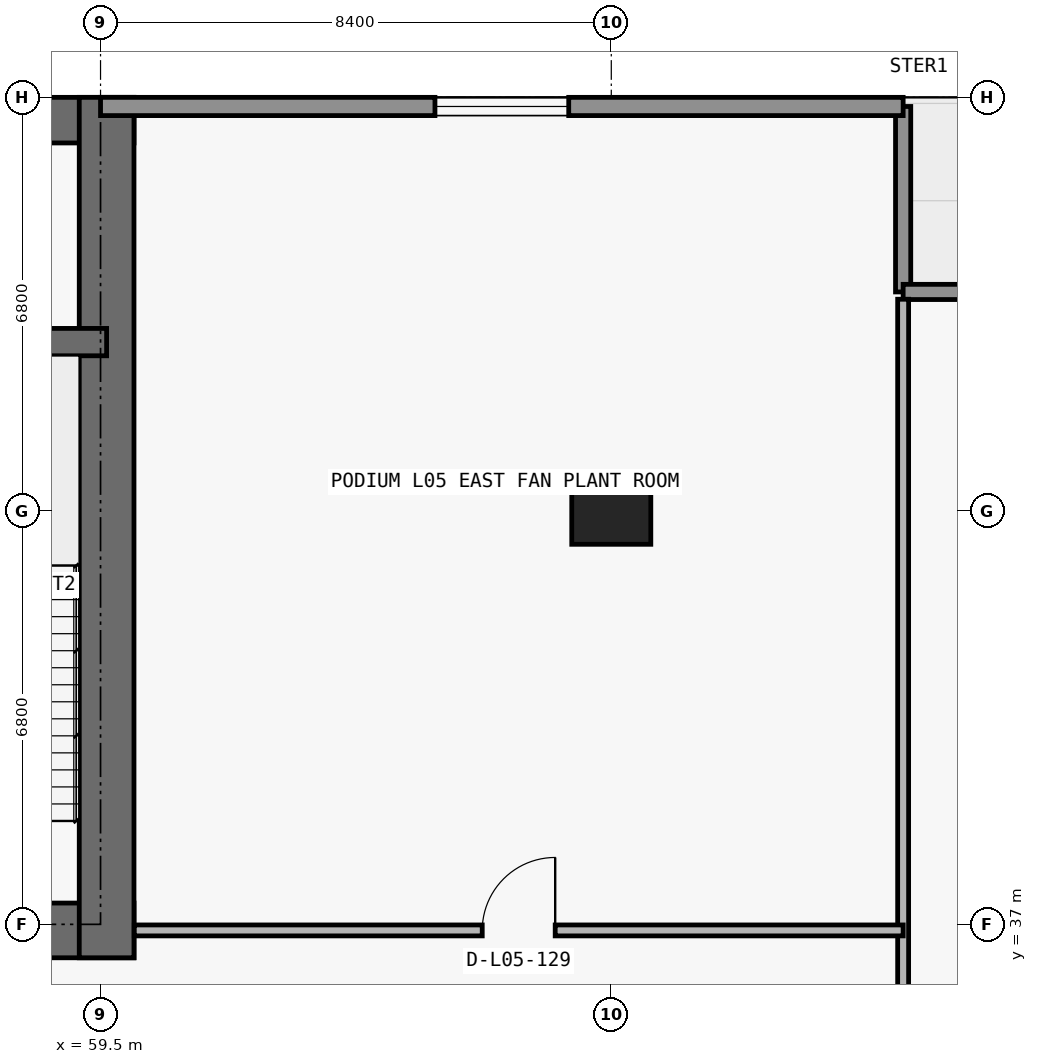
"""IFC4 building model, lengths in metres.
Left out: names, types, materials, properties, quantities, classifications, styles, units other than length and angle.
Written with IfcOpenShell. Run it as: python <this file> out.ifc"""

import sys

from ifc_helpers import new_model, si_unit, direction, frame, frame_2d, origin, origin_2d, place, context, subcontext, project, spatial, rectangle, extrude, element, fill, save


model = new_model("IFC4")
c1 = context("Model", 3, precision=1e-05, world=origin(), true_north=direction((0.0, 1.0)))
c2 = subcontext(c1, "Body", "Model", "MODEL_VIEW")
j1 = project(units=[si_unit("LENGTHUNIT", "METRE"), si_unit("PLANEANGLEUNIT", "RADIAN")], contexts=[c1])
p1 = place(None, origin())
s1 = spatial("IfcSite", under=j1, at=p1, CompositionType="ELEMENT")
p2 = place(p1, origin())
s2 = spatial("IfcBuilding", under=s1, at=p2, CompositionType="ELEMENT")
p3 = place(p2, frame((0.0, 0.0, 24.6)))
s3 = spatial("IfcBuildingStorey", under=s2, at=p3, CompositionType="ELEMENT", Elevation=24.6)
p4 = place(p3, frame((67.9, 43.8, 0.0), z_axis=(0.0, 0.0, 1.0), x_axis=(1.0, 0.0, 0.0)))
e1 = element("IfcColumn", 1, at=p4, inside=s3, PredefinedType="COLUMN", context=c2, shape_type="SweptSolid", body=[
    extrude(rectangle(XDim=1.3, YDim=1.1, at=origin_2d()), origin(), (0.0, 0.0, 1.0), 5.15),
])
p5 = place(p3, frame((17.75, 36.9, 0.0), z_axis=(0.0, 0.0, 1.0), x_axis=(1.0, 0.0, 0.0)))
e2 = element("IfcWall", 2, at=p5, inside=s3, PredefinedType="SHEAR", context=c2, shape_type="SweptSolid", body=[
    extrude(rectangle(XDim=42.3, YDim=0.9, at=frame_2d((21.15, 0.0))), origin(), (0.0, 0.0, 1.0), 5.15),
])
p6 = place(p5, frame((14.55, 0.0, 0.0)))
e3 = element("IfcOpeningElement", 3, at=p6, cuts=e2, PredefinedType="OPENING", context=c2, shape_type="SweptSolid", body=[
    extrude(rectangle(XDim=1.1, YDim=2.15, at=frame_2d((0.55, 1.075))), frame((0.0, 0.46, 0.0), z_axis=(0.0, -1.0, 0.0), x_axis=(1.0, 0.0, 0.0)), (0.0, 0.0, 1.0), 0.92),
])
p7 = place(p5, frame((6.4, 0.0, 0.0)))
e4 = element("IfcOpeningElement", 4, at=p7, cuts=e2, PredefinedType="OPENING", context=c2, shape_type="SweptSolid", body=[
    extrude(rectangle(XDim=1.05, YDim=2.15, at=frame_2d((0.525, 1.075))), frame((0.0, 0.46, 0.0), z_axis=(0.0, -1.0, 0.0), x_axis=(1.0, 0.0, 0.0)), (0.0, 0.0, 1.0), 0.92),
])
p8 = place(p5, frame((34.9, 0.0, 0.0)))
e5 = element("IfcOpeningElement", 5, at=p8, cuts=e2, PredefinedType="OPENING", context=c2, shape_type="SweptSolid", body=[
    extrude(rectangle(XDim=1.05, YDim=2.15, at=frame_2d((0.525, 1.075))), frame((0.0, 0.46, 0.0), z_axis=(0.0, -1.0, 0.0), x_axis=(1.0, 0.0, 0.0)), (0.0, 0.0, 1.0), 0.92),
])
p9 = place(p5, frame((11.012, 0.0, 0.0)))
e6 = element("IfcOpeningElement", 6, at=p9, cuts=e2, PredefinedType="OPENING", context=c2, shape_type="SweptSolid", body=[
    extrude(rectangle(XDim=1.05, YDim=2.15, at=frame_2d((0.525, 1.075))), frame((0.0, 0.46, 0.0), z_axis=(0.0, -1.0, 0.0), x_axis=(1.0, 0.0, 0.0)), (0.0, 0.0, 1.0), 0.92),
])
p10 = place(p5, frame((24.25, 0.0, 0.0)))
e7 = element("IfcOpeningElement", 7, at=p10, cuts=e2, PredefinedType="OPENING", context=c2, shape_type="SweptSolid", body=[
    extrude(rectangle(XDim=1.05, YDim=2.15, at=frame_2d((0.525, 1.075))), frame((0.0, 0.46, 0.0), z_axis=(0.0, -1.0, 0.0), x_axis=(1.0, 0.0, 0.0)), (0.0, 0.0, 1.0), 0.92),
])
p11 = place(p3, frame((17.75, 50.225, 0.0), z_axis=(0.0, 0.0, 1.0), x_axis=(1.0, 0.0, 0.0)))
e8 = element("IfcWall", 8, at=p11, inside=s3, PredefinedType="SHEAR", context=c2, shape_type="SweptSolid", body=[
    extrude(rectangle(XDim=42.3, YDim=0.75, at=frame_2d((21.15, 0.0))), origin(), (0.0, 0.0, 1.0), 5.15),
])
p12 = place(p3, frame((59.6, 36.45, 0.0), z_axis=(0.0, 0.0, 1.0), x_axis=(0.0, 1.0, 0.0)))
e9 = element("IfcWall", 9, at=p12, inside=s3, PredefinedType="SHEAR", context=c2, shape_type="SweptSolid", body=[
    extrude(rectangle(XDim=14.15, YDim=0.9, at=frame_2d((7.075, 0.0))), origin(), (0.0, 0.0, 1.0), 5.15),
])
p13 = place(p3, frame((18.2, 46.575, 0.0), z_axis=(0.0, 0.0, 1.0), x_axis=(1.0, 0.0, 0.0)))
e10 = element("IfcWall", 10, at=p13, inside=s3, PredefinedType="SHEAR", context=c2, shape_type="SweptSolid", body=[
    extrude(rectangle(XDim=41.4, YDim=0.45, at=frame_2d((20.7, 0.0))), origin(), (0.0, 0.0, 1.0), 5.15),
])
p14 = place(p13, frame((7.675, 0.0, 0.0)))
e11 = element("IfcOpeningElement", 11, at=p14, cuts=e10, PredefinedType="OPENING", context=c2, shape_type="SweptSolid", body=[
    extrude(rectangle(XDim=1.05, YDim=2.15, at=frame_2d((0.525, 1.075))), frame((0.0, 0.235, 0.0), z_axis=(0.0, -1.0, 0.0), x_axis=(1.0, 0.0, 0.0)), (0.0, 0.0, 1.0), 0.47),
])
p15 = place(p13, frame((32.725, 0.0, 0.0)))
e12 = element("IfcOpeningElement", 12, at=p15, cuts=e10, PredefinedType="OPENING", context=c2, shape_type="SweptSolid", body=[
    extrude(rectangle(XDim=1.05, YDim=2.15, at=frame_2d((0.525, 1.075))), frame((0.0, 0.235, 0.0), z_axis=(0.0, -1.0, 0.0), x_axis=(1.0, 0.0, 0.0)), (0.0, 0.0, 1.0), 0.47),
])
p16 = place(p3, frame((72.7, 50.45, 0.0), z_axis=(0.0, 0.0, 1.0), x_axis=(0.0, -1.0, 0.0)))
e13 = element("IfcWall", 13, at=p16, inside=s3, PredefinedType="ELEMENTEDWALL", context=c2, shape_type="SweptSolid", body=[
    extrude(rectangle(XDim=3.05, YDim=0.25, at=frame_2d((1.525, 0.0))), origin(), (0.0, 0.0, 1.0), 5.15),
])
p17 = place(p3, frame((72.7, 47.4, 0.0), z_axis=(0.0, 0.0, 1.0), x_axis=(1.0, 0.0, 0.0)))
e14 = element("IfcWall", 14, at=p17, inside=s3, PredefinedType="ELEMENTEDWALL", context=c2, shape_type="SweptSolid", body=[
    extrude(rectangle(XDim=3.45, YDim=0.25, at=frame_2d((1.725, 0.0))), origin(), (0.0, 0.0, 1.0), 5.15),
])
p18 = place(p3, frame((59.5, 50.45, 0.0), z_axis=(0.0, 0.0, 1.0), x_axis=(1.0, 0.0, 0.0)))
e15 = element("IfcWall", 15, at=p18, inside=s3, PredefinedType="STANDARD", context=c2, shape_type="SweptSolid", body=[
    extrude(rectangle(XDim=13.2, YDim=0.3, at=frame_2d((6.6, 0.0))), origin(), (0.0, 0.0, 1.0), 5.15),
])
p19 = place(p18, frame((5.5, 0.0, 0.85)))
e16 = element("IfcOpeningElement", 16, at=p19, cuts=e15, PredefinedType="OPENING", context=c2, shape_type="SweptSolid", body=[
    extrude(rectangle(XDim=2.2, YDim=1.55, at=frame_2d((1.1, 0.775))), frame((0.0, 0.16, 0.0), z_axis=(0.0, -1.0, 0.0), x_axis=(1.0, 0.0, 0.0)), (0.0, 0.0, 1.0), 0.32),
])
p20 = place(p3, frame((72.7, 6.32, 0.0), z_axis=(0.0, 0.0, 1.0), x_axis=(0.0, 1.0, 0.0)))
e17 = element("IfcWall", 17, at=p20, inside=s3, PredefinedType="PARTITIONING", context=c2, shape_type="SweptSolid", body=[
    extrude(rectangle(XDim=40.96, YDim=0.18, at=frame_2d((20.48, 0.0))), origin(), (0.0, 0.0, 1.0), 5.15),
])
p21 = place(p3, frame((60.055, 36.9, 0.0), z_axis=(0.0, 0.0, 1.0), x_axis=(1.0, 0.0, 0.0)))
e18 = element("IfcWall", 18, at=p21, inside=s3, PredefinedType="PARTITIONING", context=c2, shape_type="SweptSolid", body=[
    extrude(rectangle(XDim=12.645, YDim=0.18, at=frame_2d((6.323, 0.0))), origin(), (0.0, 0.0, 1.0), 5.15),
])
p22 = place(p21, frame((5.722, 0.0, 0.0)))
e19 = element("IfcOpeningElement", 19, at=p22, cuts=e18, PredefinedType="OPENING", context=c2, shape_type="SweptSolid", body=[
    extrude(rectangle(XDim=1.2, YDim=2.2, at=frame_2d((0.6, 1.1))), frame((0.0, 0.1, 0.0), z_axis=(0.0, -1.0, 0.0), x_axis=(1.0, 0.0, 0.0)), (0.0, 0.0, 1.0), 0.2),
])
p23 = place(p19, origin())
e20 = element("IfcWindow", 20, at=p23, inside=s3, PartitioningType="SINGLE_PANEL", PredefinedType="WINDOW", context=c2, shape_type="SweptSolid", body=[
    extrude(rectangle(XDim=2.2, YDim=1.55, at=frame_2d((1.1, 0.775))), frame((0.0, 0.03, 0.0), z_axis=(0.0, -1.0, 0.0), x_axis=(1.0, 0.0, 0.0)), (0.0, 0.0, 1.0), 0.06),
])
fill(e16, e20)
p24 = place(p22, origin())
e21 = element("IfcDoor", 21, at=p24, inside=s3, OperationType="SINGLE_SWING_RIGHT", PredefinedType="DOOR", context=c2, shape_type="SweptSolid", body=[
    extrude(rectangle(XDim=1.2, YDim=2.2, at=frame_2d((0.6, 1.1))), frame((0.0, 0.025, 0.0), z_axis=(0.0, -1.0, 0.0), x_axis=(1.0, 0.0, 0.0)), (0.0, 0.0, 1.0), 0.05),
])
fill(e19, e21)
save(model, sys.argv[1])
